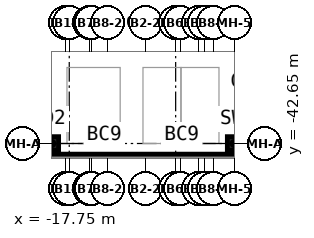
"""IFC4 building model, lengths in metres.
Left out: names, types, materials, properties, quantities, classifications, styles, units other than length and angle.
Written with IfcOpenShell. Run it as: python <this file> out.ifc"""

import sys

from ifc_helpers import new_model, si_unit, direction, frame, frame_2d, origin, origin_2d, place, context, subcontext, project, spatial, rectangle, extrude, source, transform, mapped, element, save


model = new_model("IFC4")
c1 = context("Model", 3, precision=1e-05, world=origin(), true_north=direction((0.0, 1.0)))
c2 = subcontext(c1, "Body", "Model", "MODEL_VIEW")
j1 = project(units=[si_unit("LENGTHUNIT", "METRE"), si_unit("PLANEANGLEUNIT", "RADIAN")], contexts=[c1])
p1 = place(None, origin())
s1 = spatial("IfcSite", under=j1, at=p1, CompositionType="ELEMENT")
p2 = place(p1, origin())
s2 = spatial("IfcBuilding", under=s1, at=p2, CompositionType="ELEMENT")
p3 = place(p2, frame((0.0, 0.0, -4.5)))
s3 = spatial("IfcBuildingStorey", under=s2, at=p3, CompositionType="ELEMENT", Elevation=-4.5)
m1 = source(origin(), c2, "Body", "SweptSolid", [
    extrude(rectangle(XDim=0.9, YDim=0.9, at=origin_2d()), origin(), (0.0, 0.0, 1.0), 4.5),
])
for number, where, z_axis, x_axis in (
    (1, (-18.65, -42.65, 0.0), (0.0, 0.0, 1.0), (1.0, 0.0, 0.0)),
    (2, (-6.65, -42.65, 0.0), (0.0, 0.0, 1.0), (1.0, 0.0, 0.0)),
):
    element("IfcColumn", number, at=place(p3, frame(where, z_axis=z_axis, x_axis=x_axis)), inside=s3, PredefinedType="COLUMN", context=c2, shape_type="MappedRepresentation", body=[
        mapped(m1, transform((0.0, 0.0, 0.0))),
    ])
m2 = source(origin(), c2, "Body", "SweptSolid", [
    extrude(rectangle(XDim=89.85, YDim=0.5, at=frame_2d((44.925, 0.0))), origin(), (0.0, 0.0, 1.0), 4.5),
])
p4 = place(p3, frame((-57.15, -43.6, 0.0), z_axis=(0.0, 0.0, 1.0), x_axis=(1.0, 0.0, 0.0)))
e3 = element("IfcWall", 3, at=p4, inside=s3, PredefinedType="SOLIDWALL", context=c2, shape_type="MappedRepresentation", body=[
    mapped(m2, transform((0.0, 0.0, 0.0))),
])
save(model, sys.argv[1])
